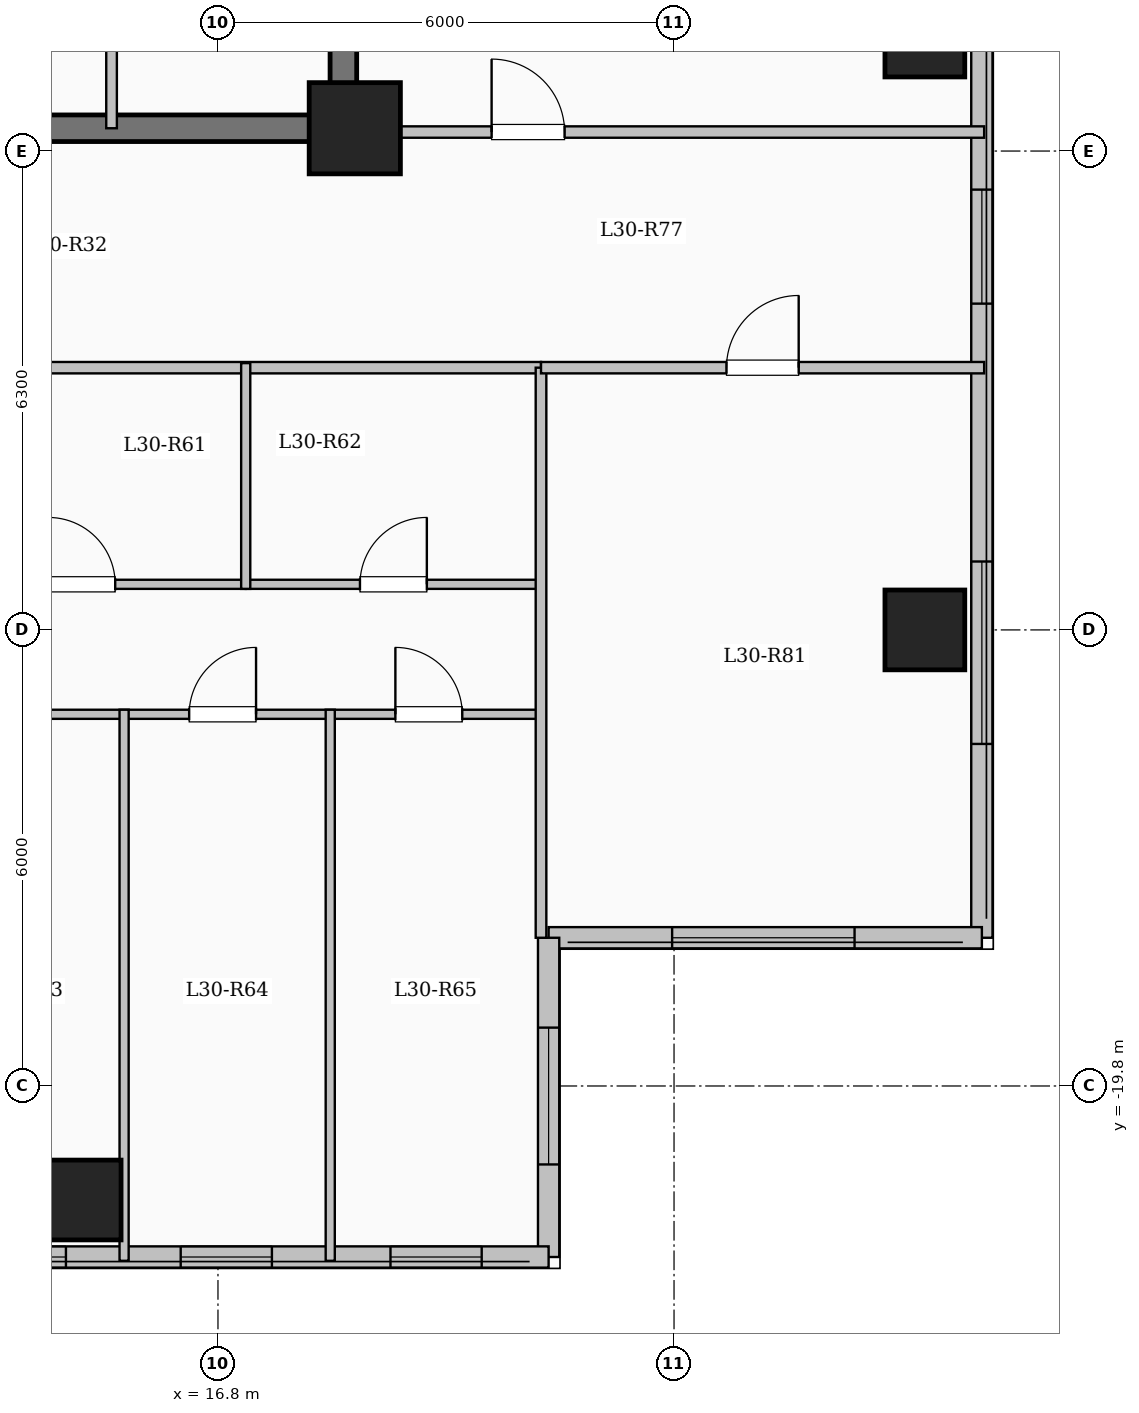
"""IFC4 building model, lengths in metres.
Left out: names, types, materials, properties, quantities, classifications, styles, units other than length and angle.
Written with IfcOpenShell. Run it as: python <this file> out.ifc"""

import sys

from ifc_helpers import new_model, si_unit, direction, frame, frame_2d, origin, origin_2d, place, context, subcontext, project, spatial, rectangle, extrude, element, fill, save


model = new_model("IFC4")
c1 = context("Model", 3, precision=1e-05, world=origin(), true_north=direction((0.0, 1.0)))
c2 = subcontext(c1, "Body", "Model", "MODEL_VIEW")
j1 = project(units=[si_unit("LENGTHUNIT", "METRE"), si_unit("PLANEANGLEUNIT", "RADIAN")], contexts=[c1])
p1 = place(None, origin())
s1 = spatial("IfcSite", under=j1, at=p1, CompositionType="ELEMENT")
p2 = place(p1, origin())
s2 = spatial("IfcBuilding", under=s1, at=p2, CompositionType="ELEMENT")
p3 = place(p2, frame((0.0, 0.0, 111.8)))
s3 = spatial("IfcBuildingStorey", under=s2, at=p3, CompositionType="ELEMENT", Elevation=111.8)
p4 = place(p3, frame((18.6, -7.2, 0.0), z_axis=(0.0, 0.0, 1.0), x_axis=(1.0, 0.0, 0.0)))
e1 = element("IfcColumn", 1, at=p4, inside=s3, PredefinedType="COLUMN", context=c2, shape_type="SweptSolid", body=[
    extrude(rectangle(XDim=1.2, YDim=1.2, at=origin_2d()), origin(), (0.0, 0.0, 1.0), 3.35),
])
for number, where, z_axis, x_axis in (
    (2, (15.0, -21.3, 0.0), (0.0, 0.0, 1.0), (1.0, 0.0, 0.0)),
    (3, (26.1, -13.8, 0.0), (0.0, 0.0, 1.0), (1.0, 0.0, 0.0)),
    (4, (26.1, -6.0, 0.0), (0.0, 0.0, 1.0), (1.0, 0.0, 0.0)),
):
    element("IfcColumn", number, at=place(p3, frame(where, z_axis=z_axis, x_axis=x_axis)), inside=s3, PredefinedType="COLUMN", context=c2, shape_type="SweptSolid", body=[
        extrude(rectangle(XDim=1.05, YDim=1.05, at=origin_2d()), origin(), (0.0, 0.0, 1.0), 3.35),
    ])
p5 = place(p3, frame((26.85, 17.85, 0.0), z_axis=(0.0, 0.0, 1.0), x_axis=(0.0, -1.0, 0.0)))
e5 = element("IfcWall", 5, at=p5, inside=s3, PredefinedType="SOLIDWALL", context=c2, shape_type="SweptSolid", body=[
    extrude(rectangle(XDim=35.7, YDim=0.28, at=frame_2d((17.85, 0.0))), origin(), (0.0, 0.0, 1.0), 3.1),
])
p6 = place(p5, frame((1.675, 0.0, 0.9)))
e6 = element("IfcOpeningElement", 6, at=p6, cuts=e5, PredefinedType="OPENING", context=c2, shape_type="SweptSolid", body=[
    extrude(rectangle(XDim=2.0, YDim=1.7, at=frame_2d((1.0, 0.85))), frame((0.0, 0.15, 0.0), z_axis=(0.0, -1.0, 0.0), x_axis=(1.0, 0.0, 0.0)), (0.0, 0.0, 1.0), 0.3),
])
p7 = place(p5, frame((5.725, 0.0, 0.95)))
e7 = element("IfcOpeningElement", 7, at=p7, cuts=e5, PredefinedType="OPENING", context=c2, shape_type="SweptSolid", body=[
    extrude(rectangle(XDim=1.0, YDim=1.5, at=frame_2d((0.5, 0.75))), frame((0.0, 0.15, 0.0), z_axis=(0.0, -1.0, 0.0), x_axis=(1.0, 0.0, 0.0)), (0.0, 0.0, 1.0), 0.3),
])
p8 = place(p5, frame((8.975, 0.0, 0.9)))
e8 = element("IfcOpeningElement", 8, at=p8, cuts=e5, PredefinedType="OPENING", context=c2, shape_type="SweptSolid", body=[
    extrude(rectangle(XDim=2.0, YDim=1.7, at=frame_2d((1.0, 0.85))), frame((0.0, 0.15, 0.0), z_axis=(0.0, -1.0, 0.0), x_axis=(1.0, 0.0, 0.0)), (0.0, 0.0, 1.0), 0.3),
])
p9 = place(p5, frame((13.725, 0.0, 0.9)))
e9 = element("IfcOpeningElement", 9, at=p9, cuts=e5, PredefinedType="OPENING", context=c2, shape_type="SweptSolid", body=[
    extrude(rectangle(XDim=1.8, YDim=1.65, at=frame_2d((0.9, 0.825))), frame((0.0, 0.15, 0.0), z_axis=(0.0, -1.0, 0.0), x_axis=(1.0, 0.0, 0.0)), (0.0, 0.0, 1.0), 0.3),
])
p10 = place(p5, frame((19.55, 0.0, 0.9)))
e10 = element("IfcOpeningElement", 10, at=p10, cuts=e5, PredefinedType="OPENING", context=c2, shape_type="SweptSolid", body=[
    extrude(rectangle(XDim=2.4, YDim=1.8, at=frame_2d((1.2, 0.9))), frame((0.0, 0.15, 0.0), z_axis=(0.0, -1.0, 0.0), x_axis=(1.0, 0.0, 0.0)), (0.0, 0.0, 1.0), 0.3),
])
p11 = place(p5, frame((25.857, 0.0, 0.9)))
e11 = element("IfcOpeningElement", 11, at=p11, cuts=e5, PredefinedType="OPENING", context=c2, shape_type="SweptSolid", body=[
    extrude(rectangle(XDim=1.5, YDim=1.65, at=frame_2d((0.75, 0.825))), frame((0.0, 0.15, 0.0), z_axis=(0.0, -1.0, 0.0), x_axis=(1.0, 0.0, 0.0)), (0.0, 0.0, 1.0), 0.3),
])
p12 = place(p5, frame((30.75, 0.0, 0.9)))
e12 = element("IfcOpeningElement", 12, at=p12, cuts=e5, PredefinedType="OPENING", context=c2, shape_type="SweptSolid", body=[
    extrude(rectangle(XDim=2.4, YDim=1.8, at=frame_2d((1.2, 0.9))), frame((0.0, 0.15, 0.0), z_axis=(0.0, -1.0, 0.0), x_axis=(1.0, 0.0, 0.0)), (0.0, 0.0, 1.0), 0.3),
])
p13 = place(p3, frame((26.85, -17.85, 0.0), z_axis=(0.0, 0.0, 1.0), x_axis=(-1.0, 0.0, 0.0)))
e13 = element("IfcWall", 13, at=p13, inside=s3, PredefinedType="SOLIDWALL", context=c2, shape_type="SweptSolid", body=[
    extrude(rectangle(XDim=5.7, YDim=0.28, at=frame_2d((2.85, 0.0))), origin(), (0.0, 0.0, 1.0), 3.1),
])
p14 = place(p13, frame((1.675, 0.0, 0.9)))
e14 = element("IfcOpeningElement", 14, at=p14, cuts=e13, PredefinedType="OPENING", context=c2, shape_type="SweptSolid", body=[
    extrude(rectangle(XDim=2.4, YDim=1.8, at=frame_2d((1.2, 0.9))), frame((0.0, 0.15, 0.0), z_axis=(0.0, -1.0, 0.0), x_axis=(1.0, 0.0, 0.0)), (0.0, 0.0, 1.0), 0.3),
])
p15 = place(p3, frame((21.15, -17.85, 0.0), z_axis=(0.0, 0.0, 1.0), x_axis=(0.0, -1.0, 0.0)))
e15 = element("IfcWall", 15, at=p15, inside=s3, PredefinedType="SOLIDWALL", context=c2, shape_type="SweptSolid", body=[
    extrude(rectangle(XDim=4.2, YDim=0.28, at=frame_2d((2.1, 0.0))), origin(), (0.0, 0.0, 1.0), 3.1),
])
p16 = place(p15, frame((1.182, 0.0, 0.9)))
e16 = element("IfcOpeningElement", 16, at=p16, cuts=e15, PredefinedType="OPENING", context=c2, shape_type="SweptSolid", body=[
    extrude(rectangle(XDim=1.8, YDim=1.65, at=frame_2d((0.9, 0.825))), frame((0.0, 0.15, 0.0), z_axis=(0.0, -1.0, 0.0), x_axis=(1.0, 0.0, 0.0)), (0.0, 0.0, 1.0), 0.3),
])
p17 = place(p3, frame((21.15, -22.05, 0.0), z_axis=(0.0, 0.0, 1.0), x_axis=(-1.0, 0.0, 0.0)))
e17 = element("IfcWall", 17, at=p17, inside=s3, PredefinedType="SOLIDWALL", context=c2, shape_type="SweptSolid", body=[
    extrude(rectangle(XDim=13.8, YDim=0.28, at=frame_2d((6.9, 0.0))), origin(), (0.0, 0.0, 1.0), 3.1),
])
p18 = place(p17, frame((0.88, 0.0, 0.95)))
e18 = element("IfcOpeningElement", 18, at=p18, cuts=e17, PredefinedType="OPENING", context=c2, shape_type="SweptSolid", body=[
    extrude(rectangle(XDim=1.2, YDim=1.5, at=frame_2d((0.6, 0.75))), frame((0.0, 0.15, 0.0), z_axis=(0.0, -1.0, 0.0), x_axis=(1.0, 0.0, 0.0)), (0.0, 0.0, 1.0), 0.3),
])
p19 = place(p17, frame((3.64, 0.0, 0.95)))
e19 = element("IfcOpeningElement", 19, at=p19, cuts=e17, PredefinedType="OPENING", context=c2, shape_type="SweptSolid", body=[
    extrude(rectangle(XDim=1.2, YDim=1.5, at=frame_2d((0.6, 0.75))), frame((0.0, 0.15, 0.0), z_axis=(0.0, -1.0, 0.0), x_axis=(1.0, 0.0, 0.0)), (0.0, 0.0, 1.0), 0.3),
])
p20 = place(p17, frame((6.35, 0.0, 0.95)))
e20 = element("IfcOpeningElement", 20, at=p20, cuts=e17, PredefinedType="OPENING", context=c2, shape_type="SweptSolid", body=[
    extrude(rectangle(XDim=1.2, YDim=1.5, at=frame_2d((0.6, 0.75))), frame((0.0, 0.15, 0.0), z_axis=(0.0, -1.0, 0.0), x_axis=(1.0, 0.0, 0.0)), (0.0, 0.0, 1.0), 0.3),
])
p21 = place(p17, frame((9.238, 0.0, 0.9)))
e21 = element("IfcOpeningElement", 21, at=p21, cuts=e17, PredefinedType="OPENING", context=c2, shape_type="SweptSolid", body=[
    extrude(rectangle(XDim=2.4, YDim=1.8, at=frame_2d((1.2, 0.9))), frame((0.0, 0.15, 0.0), z_axis=(0.0, -1.0, 0.0), x_axis=(1.0, 0.0, 0.0)), (0.0, 0.0, 1.0), 0.3),
])
p22 = place(p17, frame((12.803, 0.0, 0.95)))
e22 = element("IfcOpeningElement", 22, at=p22, cuts=e17, PredefinedType="OPENING", context=c2, shape_type="SweptSolid", body=[
    extrude(rectangle(XDim=0.85, YDim=1.5, at=frame_2d((0.425, 0.75))), frame((0.0, 0.15, 0.0), z_axis=(0.0, -1.0, 0.0), x_axis=(1.0, 0.0, 0.0)), (0.0, 0.0, 1.0), 0.3),
])
p23 = place(p3, frame((18.45, -7.375, 0.0), z_axis=(0.0, 0.0, 1.0), x_axis=(0.0, 1.0, 0.0)))
e23 = element("IfcWall", 23, at=p23, inside=s3, PredefinedType="SHEAR", context=c2, shape_type="SweptSolid", body=[
    extrude(rectangle(XDim=14.05, YDim=0.35, at=frame_2d((7.025, 0.0))), origin(), (0.0, 0.0, 1.0), 3.35),
])
p24 = place(p3, frame((10.075, -7.2, 0.0), z_axis=(0.0, 0.0, 1.0), x_axis=(1.0, 0.0, 0.0)))
e24 = element("IfcWall", 24, at=p24, inside=s3, PredefinedType="SHEAR", context=c2, shape_type="SweptSolid", body=[
    extrude(rectangle(XDim=8.55, YDim=0.35, at=frame_2d((4.275, 0.0))), origin(), (0.0, 0.0, 1.0), 3.35),
])
p25 = place(p3, frame((15.4, -7.2, 0.0), z_axis=(0.0, 0.0, 1.0), x_axis=(0.0, 1.0, 0.0)))
e25 = element("IfcWall", 25, at=p25, inside=s3, PredefinedType="PARTITIONING", context=c2, shape_type="SweptSolid", body=[
    extrude(rectangle(XDim=10.45, YDim=0.14, at=frame_2d((5.225, 0.0))), origin(), (0.0, 0.0, 1.0), 3.1),
])
p26 = place(p25, frame((9.25, 0.0, 0.0)))
e26 = element("IfcOpeningElement", 26, at=p26, cuts=e25, PredefinedType="OPENING", context=c2, shape_type="SweptSolid", body=[
    extrude(rectangle(XDim=0.9, YDim=2.08, at=frame_2d((0.45, 1.04))), frame((0.0, 0.08, 0.0), z_axis=(0.0, -1.0, 0.0), x_axis=(1.0, 0.0, 0.0)), (0.0, 0.0, 1.0), 0.16),
])
p27 = place(p3, frame((8.55, -10.35, 0.0), z_axis=(0.0, 0.0, 1.0), x_axis=(1.0, 0.0, 0.0)))
e27 = element("IfcWall", 27, at=p27, inside=s3, PredefinedType="PARTITIONING", context=c2, shape_type="SweptSolid", body=[
    extrude(rectangle(XDim=12.5, YDim=0.15, at=frame_2d((6.25, 0.0))), origin(), (0.0, 0.0, 1.0), 3.1),
])
p28 = place(p27, frame((0.75, 0.0, 0.0)))
e28 = element("IfcOpeningElement", 28, at=p28, cuts=e27, PredefinedType="OPENING", context=c2, shape_type="SweptSolid", body=[
    extrude(rectangle(XDim=0.96, YDim=2.15, at=frame_2d((0.48, 1.075))), frame((0.0, 0.085, 0.0), z_axis=(0.0, -1.0, 0.0), x_axis=(1.0, 0.0, 0.0)), (0.0, 0.0, 1.0), 0.17),
])
p29 = place(p3, frame((12.852, -13.2, 0.0), z_axis=(0.0, 0.0, 1.0), x_axis=(1.0, 0.0, 0.0)))
e29 = element("IfcWall", 29, at=p29, inside=s3, PredefinedType="PARTITIONING", context=c2, shape_type="SweptSolid", body=[
    extrude(rectangle(XDim=4.313, YDim=0.12, at=frame_2d((2.156, 0.0))), origin(), (0.0, 0.0, 1.0), 3.1),
])
p30 = place(p29, frame((1.716, 0.0, 0.0)))
e30 = element("IfcOpeningElement", 30, at=p30, cuts=e29, PredefinedType="OPENING", context=c2, shape_type="SweptSolid", body=[
    extrude(rectangle(XDim=0.88, YDim=2.1, at=frame_2d((0.44, 1.05))), frame((0.0, 0.07, 0.0), z_axis=(0.0, -1.0, 0.0), x_axis=(1.0, 0.0, 0.0)), (0.0, 0.0, 1.0), 0.14),
])
p31 = place(p3, frame((17.165, -13.2, 0.0), z_axis=(0.0, 0.0, 1.0), x_axis=(1.0, 0.0, 0.0)))
e31 = element("IfcWall", 31, at=p31, inside=s3, PredefinedType="PARTITIONING", context=c2, shape_type="SweptSolid", body=[
    extrude(rectangle(XDim=3.885, YDim=0.12, at=frame_2d((1.942, 0.0))), origin(), (0.0, 0.0, 1.0), 3.1),
])
p32 = place(p31, frame((1.503, 0.0, 0.0)))
e32 = element("IfcOpeningElement", 32, at=p32, cuts=e31, PredefinedType="OPENING", context=c2, shape_type="SweptSolid", body=[
    extrude(rectangle(XDim=0.88, YDim=2.1, at=frame_2d((0.44, 1.05))), frame((0.0, 0.07, 0.0), z_axis=(0.0, -1.0, 0.0), x_axis=(1.0, 0.0, 0.0)), (0.0, 0.0, 1.0), 0.14),
])
p33 = place(p3, frame((12.792, -14.91, 0.0), z_axis=(0.0, 0.0, 1.0), x_axis=(1.0, 0.0, 0.0)))
e33 = element("IfcWall", 33, at=p33, inside=s3, PredefinedType="PARTITIONING", context=c2, shape_type="SweptSolid", body=[
    extrude(rectangle(XDim=8.318, YDim=0.12, at=frame_2d((4.159, 0.0))), origin(), (0.0, 0.0, 1.0), 3.1),
])
p34 = place(p33, frame((0.916, 0.0, 0.0)))
e34 = element("IfcOpeningElement", 34, at=p34, cuts=e33, PredefinedType="OPENING", context=c2, shape_type="SweptSolid", body=[
    extrude(rectangle(XDim=0.88, YDim=2.1, at=frame_2d((0.44, 1.05))), frame((0.0, 0.07, 0.0), z_axis=(0.0, -1.0, 0.0), x_axis=(1.0, 0.0, 0.0)), (0.0, 0.0, 1.0), 0.14),
])
p35 = place(p33, frame((3.629, 0.0, 0.0)))
e35 = element("IfcOpeningElement", 35, at=p35, cuts=e33, PredefinedType="OPENING", context=c2, shape_type="SweptSolid", body=[
    extrude(rectangle(XDim=0.88, YDim=2.1, at=frame_2d((0.44, 1.05))), frame((0.0, 0.07, 0.0), z_axis=(0.0, -1.0, 0.0), x_axis=(1.0, 0.0, 0.0)), (0.0, 0.0, 1.0), 0.14),
])
p36 = place(p33, frame((6.342, 0.0, 0.0)))
e36 = element("IfcOpeningElement", 36, at=p36, cuts=e33, PredefinedType="OPENING", context=c2, shape_type="SweptSolid", body=[
    extrude(rectangle(XDim=0.88, YDim=2.1, at=frame_2d((0.44, 1.05))), frame((0.0, 0.07, 0.0), z_axis=(0.0, -1.0, 0.0), x_axis=(1.0, 0.0, 0.0)), (0.0, 0.0, 1.0), 0.14),
])
p37 = place(p3, frame((17.165, -13.26, 0.0), z_axis=(0.0, 0.0, 1.0), x_axis=(0.0, 1.0, 0.0)))
e37 = element("IfcWall", 37, at=p37, inside=s3, PredefinedType="PARTITIONING", context=c2, shape_type="SweptSolid", body=[
    extrude(rectangle(XDim=2.97, YDim=0.12, at=frame_2d((1.485, 0.0))), origin(), (0.0, 0.0, 1.0), 3.1),
])
for number, where, z_axis, x_axis in (
    (38, (15.565, -22.1, 0.0), (0.0, 0.0, 1.0), (0.0, 1.0, 0.0)),
    (39, (18.277, -22.1, 0.0), (0.0, 0.0, 1.0), (0.0, 1.0, 0.0)),
):
    element("IfcWall", number, at=place(p3, frame(where, z_axis=z_axis, x_axis=x_axis)), inside=s3, PredefinedType="PARTITIONING", context=c2, shape_type="SweptSolid", body=[
        extrude(rectangle(XDim=7.25, YDim=0.12, at=frame_2d((3.625, 0.0))), origin(), (0.0, 0.0, 1.0), 3.1),
    ])
p38 = place(p3, frame((18.45, -7.25, 0.0), z_axis=(0.0, 0.0, 1.0), x_axis=(1.0, 0.0, 0.0)))
e40 = element("IfcWall", 40, at=p38, inside=s3, PredefinedType="PARTITIONING", context=c2, shape_type="SweptSolid", body=[
    extrude(rectangle(XDim=8.43, YDim=0.15, at=frame_2d((4.215, 0.0))), origin(), (0.0, 0.0, 1.0), 3.1),
])
p39 = place(p38, frame((1.95, 0.0, 0.0)))
e41 = element("IfcOpeningElement", 41, at=p39, cuts=e40, PredefinedType="OPENING", context=c2, shape_type="SweptSolid", body=[
    extrude(rectangle(XDim=0.96, YDim=2.15, at=frame_2d((0.48, 1.075))), frame((0.0, 0.085, 0.0), z_axis=(0.0, -1.0, 0.0), x_axis=(1.0, 0.0, 0.0)), (0.0, 0.0, 1.0), 0.17),
])
p40 = place(p3, frame((21.05, -17.85, 0.0), z_axis=(0.0, 0.0, 1.0), x_axis=(0.0, 1.0, 0.0)))
e42 = element("IfcWall", 42, at=p40, inside=s3, PredefinedType="PARTITIONING", context=c2, shape_type="SweptSolid", body=[
    extrude(rectangle(XDim=7.5, YDim=0.14, at=frame_2d((3.75, 0.0))), origin(), (0.0, 0.0, 1.0), 3.1),
])
p41 = place(p3, frame((21.05, -10.35, 0.0), z_axis=(0.0, 0.0, 1.0), x_axis=(1.0, 0.0, 0.0)))
e43 = element("IfcWall", 43, at=p41, inside=s3, PredefinedType="PARTITIONING", context=c2, shape_type="SweptSolid", body=[
    extrude(rectangle(XDim=5.83, YDim=0.15, at=frame_2d((2.915, 0.0))), origin(), (0.0, 0.0, 1.0), 3.1),
])
p42 = place(p41, frame((2.44, 0.0, 0.0)))
e44 = element("IfcOpeningElement", 44, at=p42, cuts=e43, PredefinedType="OPENING", context=c2, shape_type="SweptSolid", body=[
    extrude(rectangle(XDim=0.95, YDim=2.15, at=frame_2d((0.475, 1.075))), frame((0.0, 0.085, 0.0), z_axis=(0.0, -1.0, 0.0), x_axis=(1.0, 0.0, 0.0)), (0.0, 0.0, 1.0), 0.17),
])
p43 = place(p11, origin())
e45 = element("IfcWindow", 45, at=p43, inside=s3, PartitioningType="SINGLE_PANEL", PredefinedType="WINDOW", context=c2, shape_type="SweptSolid", body=[
    extrude(rectangle(XDim=1.5, YDim=1.65, at=frame_2d((0.75, 0.825))), frame((0.0, 0.03, 0.0), z_axis=(0.0, -1.0, 0.0), x_axis=(1.0, 0.0, 0.0)), (0.0, 0.0, 1.0), 0.06),
])
fill(e11, e45)
p44 = place(p12, origin())
e46 = element("IfcWindow", 46, at=p44, inside=s3, PartitioningType="SINGLE_PANEL", PredefinedType="WINDOW", context=c2, shape_type="SweptSolid", body=[
    extrude(rectangle(XDim=2.4, YDim=1.8, at=frame_2d((1.2, 0.9))), frame((0.0, 0.03, 0.0), z_axis=(0.0, -1.0, 0.0), x_axis=(1.0, 0.0, 0.0)), (0.0, 0.0, 1.0), 0.06),
])
fill(e12, e46)
p45 = place(p14, origin())
e47 = element("IfcWindow", 47, at=p45, inside=s3, PartitioningType="SINGLE_PANEL", PredefinedType="WINDOW", context=c2, shape_type="SweptSolid", body=[
    extrude(rectangle(XDim=2.4, YDim=1.8, at=frame_2d((1.2, 0.9))), frame((0.0, 0.03, 0.0), z_axis=(0.0, -1.0, 0.0), x_axis=(1.0, 0.0, 0.0)), (0.0, 0.0, 1.0), 0.06),
])
fill(e14, e47)
p46 = place(p16, origin())
e48 = element("IfcWindow", 48, at=p46, inside=s3, PartitioningType="SINGLE_PANEL", PredefinedType="WINDOW", context=c2, shape_type="SweptSolid", body=[
    extrude(rectangle(XDim=1.8, YDim=1.65, at=frame_2d((0.9, 0.825))), frame((0.0, 0.03, 0.0), z_axis=(0.0, -1.0, 0.0), x_axis=(1.0, 0.0, 0.0)), (0.0, 0.0, 1.0), 0.06),
])
fill(e16, e48)
p47 = place(p18, origin())
e49 = element("IfcWindow", 49, at=p47, inside=s3, PartitioningType="SINGLE_PANEL", PredefinedType="WINDOW", context=c2, shape_type="SweptSolid", body=[
    extrude(rectangle(XDim=1.2, YDim=1.5, at=frame_2d((0.6, 0.75))), frame((0.0, 0.03, 0.0), z_axis=(0.0, -1.0, 0.0), x_axis=(1.0, 0.0, 0.0)), (0.0, 0.0, 1.0), 0.06),
])
fill(e18, e49)
p48 = place(p19, origin())
e50 = element("IfcWindow", 50, at=p48, inside=s3, PartitioningType="SINGLE_PANEL", PredefinedType="WINDOW", context=c2, shape_type="SweptSolid", body=[
    extrude(rectangle(XDim=1.2, YDim=1.5, at=frame_2d((0.6, 0.75))), frame((0.0, 0.03, 0.0), z_axis=(0.0, -1.0, 0.0), x_axis=(1.0, 0.0, 0.0)), (0.0, 0.0, 1.0), 0.06),
])
fill(e19, e50)
p49 = place(p20, origin())
e51 = element("IfcWindow", 51, at=p49, inside=s3, PartitioningType="SINGLE_PANEL", PredefinedType="WINDOW", context=c2, shape_type="SweptSolid", body=[
    extrude(rectangle(XDim=1.2, YDim=1.5, at=frame_2d((0.6, 0.75))), frame((0.0, 0.03, 0.0), z_axis=(0.0, -1.0, 0.0), x_axis=(1.0, 0.0, 0.0)), (0.0, 0.0, 1.0), 0.06),
])
fill(e20, e51)
p50 = place(p30, origin())
e52 = element("IfcDoor", 52, at=p50, inside=s3, OperationType="SINGLE_SWING_LEFT", PredefinedType="DOOR", context=c2, shape_type="SweptSolid", body=[
    extrude(rectangle(XDim=0.88, YDim=2.1, at=frame_2d((0.44, 1.05))), frame((0.0, 0.025, 0.0), z_axis=(0.0, -1.0, 0.0), x_axis=(1.0, 0.0, 0.0)), (0.0, 0.0, 1.0), 0.05),
])
fill(e30, e52)
p51 = place(p32, origin())
e53 = element("IfcDoor", 53, at=p51, inside=s3, OperationType="SINGLE_SWING_RIGHT", PredefinedType="DOOR", context=c2, shape_type="SweptSolid", body=[
    extrude(rectangle(XDim=0.88, YDim=2.1, at=frame_2d((0.44, 1.05))), frame((0.0, 0.025, 0.0), z_axis=(0.0, -1.0, 0.0), x_axis=(1.0, 0.0, 0.0)), (0.0, 0.0, 1.0), 0.05),
])
fill(e32, e53)
p52 = place(p35, origin())
e54 = element("IfcDoor", 54, at=p52, inside=s3, OperationType="SINGLE_SWING_RIGHT", PredefinedType="DOOR", context=c2, shape_type="SweptSolid", body=[
    extrude(rectangle(XDim=0.88, YDim=2.1, at=frame_2d((0.44, 1.05))), frame((0.0, 0.025, 0.0), z_axis=(0.0, -1.0, 0.0), x_axis=(1.0, 0.0, 0.0)), (0.0, 0.0, 1.0), 0.05),
])
fill(e35, e54)
p53 = place(p36, origin())
e55 = element("IfcDoor", 55, at=p53, inside=s3, OperationType="SINGLE_SWING_LEFT", PredefinedType="DOOR", context=c2, shape_type="SweptSolid", body=[
    extrude(rectangle(XDim=0.88, YDim=2.1, at=frame_2d((0.44, 1.05))), frame((0.0, 0.025, 0.0), z_axis=(0.0, -1.0, 0.0), x_axis=(1.0, 0.0, 0.0)), (0.0, 0.0, 1.0), 0.05),
])
fill(e36, e55)
p54 = place(p42, origin())
e56 = element("IfcDoor", 56, at=p54, inside=s3, OperationType="SINGLE_SWING_RIGHT", PredefinedType="DOOR", context=c2, shape_type="SweptSolid", body=[
    extrude(rectangle(XDim=0.95, YDim=2.15, at=frame_2d((0.475, 1.075))), frame((0.0, 0.025, 0.0), z_axis=(0.0, -1.0, 0.0), x_axis=(1.0, 0.0, 0.0)), (0.0, 0.0, 1.0), 0.05),
])
fill(e44, e56)
p55 = place(p39, origin())
e57 = element("IfcDoor", 57, at=p55, inside=s3, OperationType="SINGLE_SWING_LEFT", PredefinedType="DOOR", context=c2, shape_type="SweptSolid", body=[
    extrude(rectangle(XDim=0.96, YDim=2.15, at=frame_2d((0.48, 1.075))), frame((0.0, 0.025, 0.0), z_axis=(0.0, -1.0, 0.0), x_axis=(1.0, 0.0, 0.0)), (0.0, 0.0, 1.0), 0.05),
])
fill(e41, e57)
save(model, sys.argv[1])
